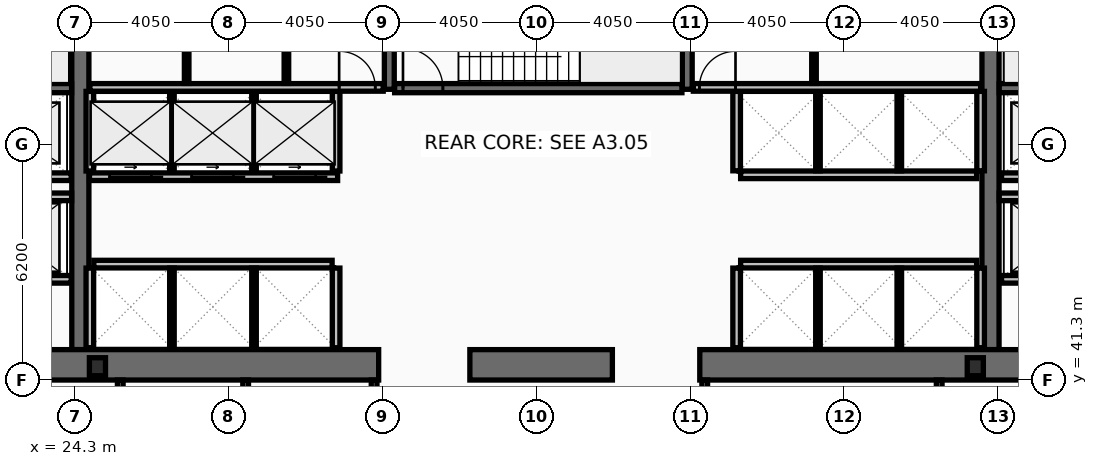
"""IFC4 building model, lengths in metres.
Left out: names, types, materials, properties, quantities, classifications, styles, units other than length and angle.
Written with IfcOpenShell. Run it as: python <this file> out.ifc"""

import sys

from ifc_helpers import new_model, si_unit, direction, frame, frame_2d, origin, origin_2d, place, context, subcontext, project, spatial, rectangle, i_section, extrude, element, fill, save


model = new_model("IFC4")
c1 = context("Model", 3, precision=1e-05, world=origin(), true_north=direction((0.0, 1.0)))
c2 = subcontext(c1, "Body", "Model", "MODEL_VIEW")
j1 = project(units=[si_unit("LENGTHUNIT", "METRE"), si_unit("PLANEANGLEUNIT", "RADIAN")], contexts=[c1])
p1 = place(None, origin())
s1 = spatial("IfcSite", under=j1, at=p1, CompositionType="ELEMENT")
p2 = place(p1, origin())
s2 = spatial("IfcBuilding", under=s1, at=p2, CompositionType="ELEMENT")
p3 = place(p2, frame((0.0, 0.0, 57.8)))
s3 = spatial("IfcBuildingStorey", under=s2, at=p3, CompositionType="ELEMENT", Elevation=57.8)
for number, where, z_axis, x_axis in (
    (1, (24.45, 42.1, 0.0), (0.0, 0.0, 1.0), (0.0, 1.0, 0.0)),
    (2, (48.4, 42.1, 0.0), (0.0, 0.0, 1.0), (0.0, 1.0, 0.0)),
):
    element("IfcWall", number, at=place(p3, frame(where, z_axis=z_axis, x_axis=x_axis)), inside=s3, PredefinedType="SHEAR", context=c2, shape_type="SweptSolid", body=[
        extrude(rectangle(XDim=10.8, YDim=0.45, at=frame_2d((5.4, 0.0))), origin(), (0.0, 0.0, 1.0), 3.82),
    ])
p4 = place(p3, frame((32.3, 41.7, 0.0), z_axis=(0.0, 0.0, 1.0), x_axis=(-1.0, 0.0, 0.0)))
e3 = element("IfcWall", 3, at=p4, inside=s3, PredefinedType="SHEAR", context=c2, shape_type="SweptSolid", body=[
    extrude(rectangle(XDim=11.45, YDim=0.8, at=frame_2d((5.725, 0.0))), origin(), (0.0, 0.0, 1.0), 3.82),
])
p5 = place(p3, frame((38.45, 41.7, 0.0), z_axis=(0.0, 0.0, 1.0), x_axis=(-1.0, 0.0, 0.0)))
e4 = element("IfcWall", 4, at=p5, inside=s3, PredefinedType="SHEAR", context=c2, shape_type="SweptSolid", body=[
    extrude(rectangle(XDim=3.75, YDim=0.8, at=frame_2d((1.875, 0.0))), origin(), (0.0, 0.0, 1.0), 3.82),
])
p6 = place(p3, frame((52.05, 41.7, 0.0), z_axis=(0.0, 0.0, 1.0), x_axis=(-1.0, 0.0, 0.0)))
e5 = element("IfcWall", 5, at=p6, inside=s3, PredefinedType="SHEAR", context=c2, shape_type="SweptSolid", body=[
    extrude(rectangle(XDim=11.3, YDim=0.8, at=frame_2d((5.65, 0.0))), origin(), (0.0, 0.0, 1.0), 3.82),
])
for number, where, z_axis, x_axis in (
    (6, (32.58, 48.95, 0.0), (0.0, 0.0, 1.0), (0.0, 1.0, 0.0)),
    (7, (40.42, 48.95, 0.0), (0.0, 0.0, 1.0), (0.0, 1.0, 0.0)),
):
    element("IfcWall", number, at=place(p3, frame(where, z_axis=z_axis, x_axis=x_axis)), inside=s3, PredefinedType="SHEAR", context=c2, shape_type="SweptSolid", body=[
        extrude(rectangle(XDim=3.95, YDim=0.26, at=frame_2d((1.975, 0.0))), origin(), (0.0, 0.0, 1.0), 3.82),
    ])
p7 = place(p3, frame((17.0, 48.98, 0.0), z_axis=(0.0, 0.0, 1.0), x_axis=(1.0, 0.0, 0.0)))
e8 = element("IfcWall", 8, at=p7, inside=s3, PredefinedType="SHEAR", context=c2, shape_type="SweptSolid", body=[
    extrude(rectangle(XDim=7.22, YDim=0.24, at=frame_2d((3.61, 0.0))), origin(), (0.0, 0.0, 1.0), 3.82),
])
p8 = place(p7, frame((0.22, 0.0, 0.0)))
e9 = element("IfcOpeningElement", 9, at=p8, cuts=e8, PredefinedType="OPENING", context=c2, shape_type="SweptSolid", body=[
    extrude(rectangle(XDim=1.05, YDim=2.15, at=frame_2d((0.525, 1.075))), frame((0.0, 0.13, 0.0), z_axis=(0.0, -1.0, 0.0), x_axis=(1.0, 0.0, 0.0)), (0.0, 0.0, 1.0), 0.26),
])
p9 = place(p3, frame((48.63, 48.98, 0.0), z_axis=(0.0, 0.0, 1.0), x_axis=(1.0, 0.0, 0.0)))
e10 = element("IfcWall", 10, at=p9, inside=s3, PredefinedType="SHEAR", context=c2, shape_type="SweptSolid", body=[
    extrude(rectangle(XDim=7.27, YDim=0.24, at=frame_2d((3.635, 0.0))), origin(), (0.0, 0.0, 1.0), 3.82),
])
p10 = place(p9, frame((6.0, 0.0, 0.0)))
e11 = element("IfcOpeningElement", 11, at=p10, cuts=e10, PredefinedType="OPENING", context=c2, shape_type="SweptSolid", body=[
    extrude(rectangle(XDim=1.05, YDim=2.15, at=frame_2d((0.525, 1.075))), frame((0.0, 0.13, 0.0), z_axis=(0.0, -1.0, 0.0), x_axis=(1.0, 0.0, 0.0)), (0.0, 0.0, 1.0), 0.26),
])
p11 = place(p3, frame((32.72, 48.98, 0.0), z_axis=(0.0, 0.0, 1.0), x_axis=(1.0, 0.0, 0.0)))
e12 = element("IfcWall", 12, at=p11, inside=s3, PredefinedType="SHEAR", context=c2, shape_type="SweptSolid", body=[
    extrude(rectangle(XDim=7.56, YDim=0.24, at=frame_2d((3.78, 0.0))), origin(), (0.0, 0.0, 1.0), 3.82),
])
p12 = place(p11, frame((0.22, 0.0, 0.0)))
e13 = element("IfcOpeningElement", 13, at=p12, cuts=e12, PredefinedType="OPENING", context=c2, shape_type="SweptSolid", body=[
    extrude(rectangle(XDim=1.05, YDim=2.15, at=frame_2d((0.525, 1.075))), frame((0.0, 0.13, 0.0), z_axis=(0.0, -1.0, 0.0), x_axis=(1.0, 0.0, 0.0)), (0.0, 0.0, 1.0), 0.26),
])
for number, where, z_axis, x_axis in (
    (14, (24.9, 41.65, 0.0), (0.0, 0.0, 1.0), (1.0, 0.0, 0.0)),
    (15, (48.0, 41.65, 0.0), (0.0, 0.0, 1.0), (1.0, 0.0, 0.0)),
):
    element("IfcColumn", number, at=place(p3, frame(where, z_axis=z_axis, x_axis=x_axis)), inside=s3, PredefinedType="COLUMN", context=c2, shape_type="SweptSolid", body=[
        extrude(i_section(OverallWidth=0.424, OverallDepth=0.474, WebThickness=0.048, FlangeThickness=0.077, at=origin_2d()), origin(), (0.0, 0.0, 1.0), 4.0),
    ])
p13 = place(p3, frame((51.61, 43.95, 0.0), z_axis=(0.0, 0.0, 1.0), x_axis=(-1.0, 0.0, 0.0)))
e16 = element("IfcWall", 16, at=p13, inside=s3, PredefinedType="PARTITIONING", context=c2, shape_type="SweptSolid", body=[
    extrude(rectangle(XDim=2.92, YDim=0.2, at=frame_2d((1.46, 0.0))), origin(), (0.0, 0.0, 1.0), 3.82),
])
p14 = place(p13, frame((0.81, 0.0, 0.0)))
e17 = element("IfcOpeningElement", 17, at=p14, cuts=e16, PredefinedType="OPENING", context=c2, shape_type="SweptSolid", body=[
    extrude(rectangle(XDim=1.3, YDim=2.18, at=frame_2d((0.65, 1.09))), frame((0.0, 0.11, 0.0), z_axis=(0.0, -1.0, 0.0), x_axis=(1.0, 0.0, 0.0)), (0.0, 0.0, 1.0), 0.22),
])
p15 = place(p3, frame((24.21, 43.95, 0.0), z_axis=(0.0, 0.0, 1.0), x_axis=(-1.0, 0.0, 0.0)))
e18 = element("IfcWall", 18, at=p15, inside=s3, PredefinedType="PARTITIONING", context=c2, shape_type="SweptSolid", body=[
    extrude(rectangle(XDim=2.97, YDim=0.2, at=frame_2d((1.485, 0.0))), origin(), (0.0, 0.0, 1.0), 3.82),
])
p16 = place(p15, frame((0.86, 0.0, 0.0)))
e19 = element("IfcOpeningElement", 19, at=p16, cuts=e18, PredefinedType="OPENING", context=c2, shape_type="SweptSolid", body=[
    extrude(rectangle(XDim=1.3, YDim=2.18, at=frame_2d((0.65, 1.09))), frame((0.0, 0.11, 0.0), z_axis=(0.0, -1.0, 0.0), x_axis=(1.0, 0.0, 0.0)), (0.0, 0.0, 1.0), 0.22),
])
p17 = place(p3, frame((51.61, 46.65, 0.0), z_axis=(0.0, 0.0, 1.0), x_axis=(-1.0, 0.0, 0.0)))
e20 = element("IfcWall", 20, at=p17, inside=s3, PredefinedType="PARTITIONING", context=c2, shape_type="SweptSolid", body=[
    extrude(rectangle(XDim=2.92, YDim=0.2, at=frame_2d((1.46, 0.0))), origin(), (0.0, 0.0, 1.0), 3.82),
])
p18 = place(p17, frame((0.86, 0.0, 0.0)))
e21 = element("IfcOpeningElement", 21, at=p18, cuts=e20, PredefinedType="OPENING", context=c2, shape_type="SweptSolid", body=[
    extrude(rectangle(XDim=1.2, YDim=2.18, at=frame_2d((0.6, 1.09))), frame((0.0, 0.11, 0.0), z_axis=(0.0, -1.0, 0.0), x_axis=(1.0, 0.0, 0.0)), (0.0, 0.0, 1.0), 0.22),
])
p19 = place(p3, frame((24.21, 46.65, 0.0), z_axis=(0.0, 0.0, 1.0), x_axis=(-1.0, 0.0, 0.0)))
e22 = element("IfcWall", 22, at=p19, inside=s3, PredefinedType="PARTITIONING", context=c2, shape_type="SweptSolid", body=[
    extrude(rectangle(XDim=2.97, YDim=0.2, at=frame_2d((1.485, 0.0))), origin(), (0.0, 0.0, 1.0), 3.82),
])
p20 = place(p19, frame((0.91, 0.0, 0.0)))
e23 = element("IfcOpeningElement", 23, at=p20, cuts=e22, PredefinedType="OPENING", context=c2, shape_type="SweptSolid", body=[
    extrude(rectangle(XDim=1.2, YDim=2.18, at=frame_2d((0.6, 1.09))), frame((0.0, 0.11, 0.0), z_axis=(0.0, -1.0, 0.0), x_axis=(1.0, 0.0, 0.0)), (0.0, 0.0, 1.0), 0.22),
])
p21 = place(p3, frame((31.22, 46.65, 0.0), z_axis=(0.0, 0.0, 1.0), x_axis=(-1.0, 0.0, 0.0)))
e24 = element("IfcWall", 24, at=p21, inside=s3, PredefinedType="PARTITIONING", context=c2, shape_type="SweptSolid", body=[
    extrude(rectangle(XDim=6.53, YDim=0.2, at=frame_2d((3.265, 0.0))), origin(), (0.0, 0.0, 1.0), 3.82),
])
p22 = place(p21, frame((4.9, 0.0, 0.0)))
e25 = element("IfcOpeningElement", 25, at=p22, cuts=e24, PredefinedType="OPENING", context=c2, shape_type="SweptSolid", body=[
    extrude(rectangle(XDim=1.1, YDim=2.18, at=frame_2d((0.55, 1.09))), frame((0.0, 0.11, 0.0), z_axis=(0.0, -1.0, 0.0), x_axis=(1.0, 0.0, 0.0)), (0.0, 0.0, 1.0), 0.22),
])
p23 = place(p21, frame((2.74, 0.0, 0.0)))
e26 = element("IfcOpeningElement", 26, at=p23, cuts=e24, PredefinedType="OPENING", context=c2, shape_type="SweptSolid", body=[
    extrude(rectangle(XDim=1.1, YDim=2.18, at=frame_2d((0.55, 1.09))), frame((0.0, 0.11, 0.0), z_axis=(0.0, -1.0, 0.0), x_axis=(1.0, 0.0, 0.0)), (0.0, 0.0, 1.0), 0.22),
])
p24 = place(p21, frame((0.58, 0.0, 0.0)))
e27 = element("IfcOpeningElement", 27, at=p24, cuts=e24, PredefinedType="OPENING", context=c2, shape_type="SweptSolid", body=[
    extrude(rectangle(XDim=1.1, YDim=2.18, at=frame_2d((0.55, 1.09))), frame((0.0, 0.11, 0.0), z_axis=(0.0, -1.0, 0.0), x_axis=(1.0, 0.0, 0.0)), (0.0, 0.0, 1.0), 0.22),
])
p25 = place(p3, frame((21.2, 46.12, 0.0), z_axis=(0.0, 0.0, 1.0), x_axis=(1.0, 0.0, 0.0)))
e28 = element("IfcWall", 28, at=p25, inside=s3, PredefinedType="PARTITIONING", context=c2, shape_type="SweptSolid", body=[
    extrude(rectangle(XDim=3.02, YDim=0.2, at=frame_2d((1.51, 0.0))), origin(), (0.0, 0.0, 1.0), 3.82),
])
p26 = place(p3, frame((48.63, 46.12, 0.0), z_axis=(0.0, 0.0, 1.0), x_axis=(1.0, 0.0, 0.0)))
e29 = element("IfcWall", 29, at=p26, inside=s3, PredefinedType="PARTITIONING", context=c2, shape_type="SweptSolid", body=[
    extrude(rectangle(XDim=3.07, YDim=0.2, at=frame_2d((1.535, 0.0))), origin(), (0.0, 0.0, 1.0), 3.82),
])
for number, where, z_axis, x_axis in (
    (30, (24.7, 46.8, 0.0), (0.0, 0.0, 1.0), (0.0, 1.0, 0.0)),
    (31, (31.18, 46.8, 0.0), (0.0, 0.0, 1.0), (0.0, 1.0, 0.0)),
):
    element("IfcWall", number, at=place(p3, frame(where, z_axis=z_axis, x_axis=x_axis)), inside=s3, PredefinedType="PARTITIONING", context=c2, shape_type="SweptSolid", body=[
        extrude(rectangle(XDim=2.095, YDim=0.2, at=frame_2d((1.047, 0.0))), origin(), (0.0, 0.0, 1.0), 3.82),
    ])
for number, where, z_axis, x_axis in (
    (32, (26.86, 46.8, 0.0), (0.0, 0.0, 1.0), (0.0, 1.0, 0.0)),
    (33, (29.02, 46.8, 0.0), (0.0, 0.0, 1.0), (0.0, 1.0, 0.0)),
):
    element("IfcWall", number, at=place(p3, frame(where, z_axis=z_axis, x_axis=x_axis)), inside=s3, PredefinedType="PARTITIONING", context=c2, shape_type="SweptSolid", body=[
        extrude(rectangle(XDim=2.095, YDim=0.12, at=frame_2d((1.047, 0.0))), origin(), (0.0, 0.0, 1.0), 3.82),
    ])
p27 = place(p3, frame((24.805, 44.35, 0.0), z_axis=(0.0, 0.0, 1.0), x_axis=(1.0, 0.0, 0.0)))
e34 = element("IfcWall", 34, at=p27, inside=s3, PredefinedType="PARTITIONING", context=c2, shape_type="SweptSolid", body=[
    extrude(rectangle(XDim=6.27, YDim=0.2, at=frame_2d((3.135, 0.0))), origin(), (0.0, 0.0, 1.0), 3.82),
])
for number, where, z_axis, x_axis in (
    (35, (24.7, 42.15, 0.0), (0.0, 0.0, 1.0), (0.0, 1.0, 0.0)),
    (36, (31.18, 42.15, 0.0), (0.0, 0.0, 1.0), (0.0, 1.0, 0.0)),
):
    element("IfcWall", number, at=place(p3, frame(where, z_axis=z_axis, x_axis=x_axis)), inside=s3, PredefinedType="PARTITIONING", context=c2, shape_type="SweptSolid", body=[
        extrude(rectangle(XDim=2.095, YDim=0.2, at=frame_2d((1.048, 0.0))), origin(), (0.0, 0.0, 1.0), 3.82),
    ])
for number, where, z_axis, x_axis in (
    (37, (26.86, 42.15, 0.0), (0.0, 0.0, 1.0), (0.0, 1.0, 0.0)),
    (38, (29.02, 42.15, 0.0), (0.0, 0.0, 1.0), (0.0, 1.0, 0.0)),
):
    element("IfcWall", number, at=place(p3, frame(where, z_axis=z_axis, x_axis=x_axis)), inside=s3, PredefinedType="PARTITIONING", context=c2, shape_type="SweptSolid", body=[
        extrude(rectangle(XDim=2.095, YDim=0.12, at=frame_2d((1.048, 0.0))), origin(), (0.0, 0.0, 1.0), 3.82),
    ])
p28 = place(p3, frame((41.825, 46.7, 0.0), z_axis=(0.0, 0.0, 1.0), x_axis=(1.0, 0.0, 0.0)))
e39 = element("IfcWall", 39, at=p28, inside=s3, PredefinedType="PARTITIONING", context=c2, shape_type="SweptSolid", body=[
    extrude(rectangle(XDim=6.21, YDim=0.2, at=frame_2d((3.105, 0.0))), origin(), (0.0, 0.0, 1.0), 3.82),
])
for number, where, z_axis, x_axis in (
    (40, (41.72, 46.805, 0.0), (0.0, 0.0, 1.0), (0.0, 1.0, 0.0)),
    (41, (48.14, 46.805, 0.0), (0.0, 0.0, 1.0), (0.0, 1.0, 0.0)),
):
    element("IfcWall", number, at=place(p3, frame(where, z_axis=z_axis, x_axis=x_axis)), inside=s3, PredefinedType="PARTITIONING", context=c2, shape_type="SweptSolid", body=[
        extrude(rectangle(XDim=2.09, YDim=0.2, at=frame_2d((1.045, 0.0))), origin(), (0.0, 0.0, 1.0), 3.82),
    ])
for number, where, z_axis, x_axis in (
    (42, (43.86, 46.805, 0.0), (0.0, 0.0, 1.0), (0.0, 1.0, 0.0)),
    (43, (46.0, 46.805, 0.0), (0.0, 0.0, 1.0), (0.0, 1.0, 0.0)),
):
    element("IfcWall", number, at=place(p3, frame(where, z_axis=z_axis, x_axis=x_axis)), inside=s3, PredefinedType="PARTITIONING", context=c2, shape_type="SweptSolid", body=[
        extrude(rectangle(XDim=2.09, YDim=0.12, at=frame_2d((1.045, 0.0))), origin(), (0.0, 0.0, 1.0), 3.82),
    ])
p29 = place(p3, frame((41.825, 44.35, 0.0), z_axis=(0.0, 0.0, 1.0), x_axis=(1.0, 0.0, 0.0)))
e44 = element("IfcWall", 44, at=p29, inside=s3, PredefinedType="PARTITIONING", context=c2, shape_type="SweptSolid", body=[
    extrude(rectangle(XDim=6.21, YDim=0.2, at=frame_2d((3.105, 0.0))), origin(), (0.0, 0.0, 1.0), 3.82),
])
for number, where, z_axis, x_axis in (
    (45, (41.72, 42.15, 0.0), (0.0, 0.0, 1.0), (0.0, 1.0, 0.0)),
    (46, (48.14, 42.15, 0.0), (0.0, 0.0, 1.0), (0.0, 1.0, 0.0)),
):
    element("IfcWall", number, at=place(p3, frame(where, z_axis=z_axis, x_axis=x_axis)), inside=s3, PredefinedType="PARTITIONING", context=c2, shape_type="SweptSolid", body=[
        extrude(rectangle(XDim=2.095, YDim=0.2, at=frame_2d((1.048, 0.0))), origin(), (0.0, 0.0, 1.0), 3.82),
    ])
for number, where, z_axis, x_axis in (
    (47, (43.86, 42.15, 0.0), (0.0, 0.0, 1.0), (0.0, 1.0, 0.0)),
    (48, (46.0, 42.15, 0.0), (0.0, 0.0, 1.0), (0.0, 1.0, 0.0)),
):
    element("IfcWall", number, at=place(p3, frame(where, z_axis=z_axis, x_axis=x_axis)), inside=s3, PredefinedType="PARTITIONING", context=c2, shape_type="SweptSolid", body=[
        extrude(rectangle(XDim=2.095, YDim=0.12, at=frame_2d((1.048, 0.0))), origin(), (0.0, 0.0, 1.0), 3.82),
    ])
p30 = place(p3, frame((24.7, 49.0, 0.0), z_axis=(0.0, 0.0, 1.0), x_axis=(1.0, 0.0, 0.0)))
e49 = element("IfcWall", 49, at=p30, inside=s3, PredefinedType="PARTITIONING", context=c2, shape_type="SweptSolid", body=[
    extrude(rectangle(XDim=7.72, YDim=0.2, at=frame_2d((3.86, 0.0))), origin(), (0.0, 0.0, 1.0), 3.82),
])
p31 = place(p30, frame((6.56, 0.0, 0.0)))
e50 = element("IfcOpeningElement", 50, at=p31, cuts=e49, PredefinedType="OPENING", context=c2, shape_type="SweptSolid", body=[
    extrude(rectangle(XDim=0.95, YDim=2.1, at=frame_2d((0.475, 1.05))), frame((0.0, 0.11, 0.0), z_axis=(0.0, -1.0, 0.0), x_axis=(1.0, 0.0, 0.0)), (0.0, 0.0, 1.0), 0.22),
])
p32 = place(p3, frame((27.248, 49.105, 0.0), z_axis=(0.0, 0.0, 1.0), x_axis=(0.0, 1.0, 0.0)))
e51 = element("IfcWall", 51, at=p32, inside=s3, PredefinedType="PARTITIONING", context=c2, shape_type="SweptSolid", body=[
    extrude(rectangle(XDim=3.69, YDim=0.12, at=frame_2d((1.845, 0.0))), origin(), (0.0, 0.0, 1.0), 3.82),
])
p33 = place(p32, frame((1.05, 0.0, 0.0)))
e52 = element("IfcOpeningElement", 52, at=p33, cuts=e51, PredefinedType="OPENING", context=c2, shape_type="SweptSolid", body=[
    extrude(rectangle(XDim=0.9, YDim=2.05, at=frame_2d((0.45, 1.025))), frame((0.0, 0.07, 0.0), z_axis=(0.0, -1.0, 0.0), x_axis=(1.0, 0.0, 0.0)), (0.0, 0.0, 1.0), 0.14),
])
p34 = place(p3, frame((29.872, 49.105, 0.0), z_axis=(0.0, 0.0, 1.0), x_axis=(0.0, 1.0, 0.0)))
e53 = element("IfcWall", 53, at=p34, inside=s3, PredefinedType="PARTITIONING", context=c2, shape_type="SweptSolid", body=[
    extrude(rectangle(XDim=3.69, YDim=0.12, at=frame_2d((1.845, 0.0))), origin(), (0.0, 0.0, 1.0), 3.82),
])
p35 = place(p34, frame((1.05, 0.0, 0.0)))
e54 = element("IfcOpeningElement", 54, at=p35, cuts=e53, PredefinedType="OPENING", context=c2, shape_type="SweptSolid", body=[
    extrude(rectangle(XDim=0.9, YDim=2.05, at=frame_2d((0.45, 1.025))), frame((0.0, 0.07, 0.0), z_axis=(0.0, -1.0, 0.0), x_axis=(1.0, 0.0, 0.0)), (0.0, 0.0, 1.0), 0.14),
])
p36 = place(p3, frame((40.58, 49.0, 0.0), z_axis=(0.0, 0.0, 1.0), x_axis=(1.0, 0.0, 0.0)))
e55 = element("IfcWall", 55, at=p36, inside=s3, PredefinedType="PARTITIONING", context=c2, shape_type="SweptSolid", body=[
    extrude(rectangle(XDim=7.56, YDim=0.2, at=frame_2d((3.78, 0.0))), origin(), (0.0, 0.0, 1.0), 3.82),
])
p37 = place(p36, frame((0.16, 0.0, 0.0)))
e56 = element("IfcOpeningElement", 56, at=p37, cuts=e55, PredefinedType="OPENING", context=c2, shape_type="SweptSolid", body=[
    extrude(rectangle(XDim=0.95, YDim=2.1, at=frame_2d((0.475, 1.05))), frame((0.0, 0.11, 0.0), z_axis=(0.0, -1.0, 0.0), x_axis=(1.0, 0.0, 0.0)), (0.0, 0.0, 1.0), 0.22),
])
p38 = place(p3, frame((43.755, 49.105, 0.0), z_axis=(0.0, 0.0, 1.0), x_axis=(0.0, 1.0, 0.0)))
e57 = element("IfcWall", 57, at=p38, inside=s3, PredefinedType="PARTITIONING", context=c2, shape_type="SweptSolid", body=[
    extrude(rectangle(XDim=3.69, YDim=0.12, at=frame_2d((1.845, 0.0))), origin(), (0.0, 0.0, 1.0), 3.82),
])
p39 = place(p38, frame((1.05, 0.0, 0.0)))
e58 = element("IfcOpeningElement", 58, at=p39, cuts=e57, PredefinedType="OPENING", context=c2, shape_type="SweptSolid", body=[
    extrude(rectangle(XDim=0.9, YDim=2.05, at=frame_2d((0.45, 1.025))), frame((0.0, 0.07, 0.0), z_axis=(0.0, -1.0, 0.0), x_axis=(1.0, 0.0, 0.0)), (0.0, 0.0, 1.0), 0.14),
])
for number, where, z_axis, x_axis in (
    (59, (25.5, 38.28, 0.0), (0.0, 0.0, 1.0), (0.0, 1.0, 0.0)),
    (60, (28.8, 38.28, 0.0), (0.0, 0.0, 1.0), (0.0, 1.0, 0.0)),
    (61, (32.18, 38.28, 0.0), (0.0, 0.0, 1.0), (0.0, 1.0, 0.0)),
    (62, (40.88, 38.28, 0.0), (0.0, 0.0, 1.0), (0.0, 1.0, 0.0)),
    (63, (47.05, 38.28, 0.0), (0.0, 0.0, 1.0), (0.0, 1.0, 0.0)),
):
    element("IfcWall", number, at=place(p3, frame(where, z_axis=z_axis, x_axis=x_axis)), inside=s3, PredefinedType="PARTITIONING", context=c2, shape_type="SweptSolid", body=[
        extrude(rectangle(XDim=3.02, YDim=0.15, at=frame_2d((1.51, 0.0))), origin(), (0.0, 0.0, 1.0), 3.82),
    ])
p40 = place(p12, origin())
e64 = element("IfcDoor", 64, at=p40, inside=s3, OperationType="SINGLE_SWING_LEFT", PredefinedType="DOOR", context=c2, shape_type="SweptSolid", body=[
    extrude(rectangle(XDim=1.05, YDim=2.15, at=frame_2d((0.525, 1.075))), frame((0.0, 0.025, 0.0), z_axis=(0.0, -1.0, 0.0), x_axis=(1.0, 0.0, 0.0)), (0.0, 0.0, 1.0), 0.05),
])
fill(e13, e64)
p41 = place(p22, origin())
e65 = element("IfcDoor", 65, at=p41, inside=s3, OperationType="SLIDING_TO_LEFT", PredefinedType="DOOR", context=c2, shape_type="SweptSolid", body=[
    extrude(rectangle(XDim=1.1, YDim=2.18, at=frame_2d((0.55, 1.09))), frame((0.0, 0.025, 0.0), z_axis=(0.0, -1.0, 0.0), x_axis=(1.0, 0.0, 0.0)), (0.0, 0.0, 1.0), 0.05),
])
fill(e25, e65)
p42 = place(p23, origin())
e66 = element("IfcDoor", 66, at=p42, inside=s3, OperationType="SLIDING_TO_LEFT", PredefinedType="DOOR", context=c2, shape_type="SweptSolid", body=[
    extrude(rectangle(XDim=1.1, YDim=2.18, at=frame_2d((0.55, 1.09))), frame((0.0, 0.025, 0.0), z_axis=(0.0, -1.0, 0.0), x_axis=(1.0, 0.0, 0.0)), (0.0, 0.0, 1.0), 0.05),
])
fill(e26, e66)
p43 = place(p24, origin())
e67 = element("IfcDoor", 67, at=p43, inside=s3, OperationType="SLIDING_TO_LEFT", PredefinedType="DOOR", context=c2, shape_type="SweptSolid", body=[
    extrude(rectangle(XDim=1.1, YDim=2.18, at=frame_2d((0.55, 1.09))), frame((0.0, 0.025, 0.0), z_axis=(0.0, -1.0, 0.0), x_axis=(1.0, 0.0, 0.0)), (0.0, 0.0, 1.0), 0.05),
])
fill(e27, e67)
p44 = place(p31, origin())
e68 = element("IfcDoor", 68, at=p44, inside=s3, OperationType="SINGLE_SWING_LEFT", PredefinedType="DOOR", context=c2, shape_type="SweptSolid", body=[
    extrude(rectangle(XDim=0.95, YDim=2.1, at=frame_2d((0.475, 1.05))), frame((0.0, 0.025, 0.0), z_axis=(0.0, -1.0, 0.0), x_axis=(1.0, 0.0, 0.0)), (0.0, 0.0, 1.0), 0.05),
])
fill(e50, e68)
p45 = place(p37, origin())
e69 = element("IfcDoor", 69, at=p45, inside=s3, OperationType="SINGLE_SWING_RIGHT", PredefinedType="DOOR", context=c2, shape_type="SweptSolid", body=[
    extrude(rectangle(XDim=0.95, YDim=2.1, at=frame_2d((0.475, 1.05))), frame((0.0, 0.025, 0.0), z_axis=(0.0, -1.0, 0.0), x_axis=(1.0, 0.0, 0.0)), (0.0, 0.0, 1.0), 0.05),
])
fill(e56, e69)
save(model, sys.argv[1])
